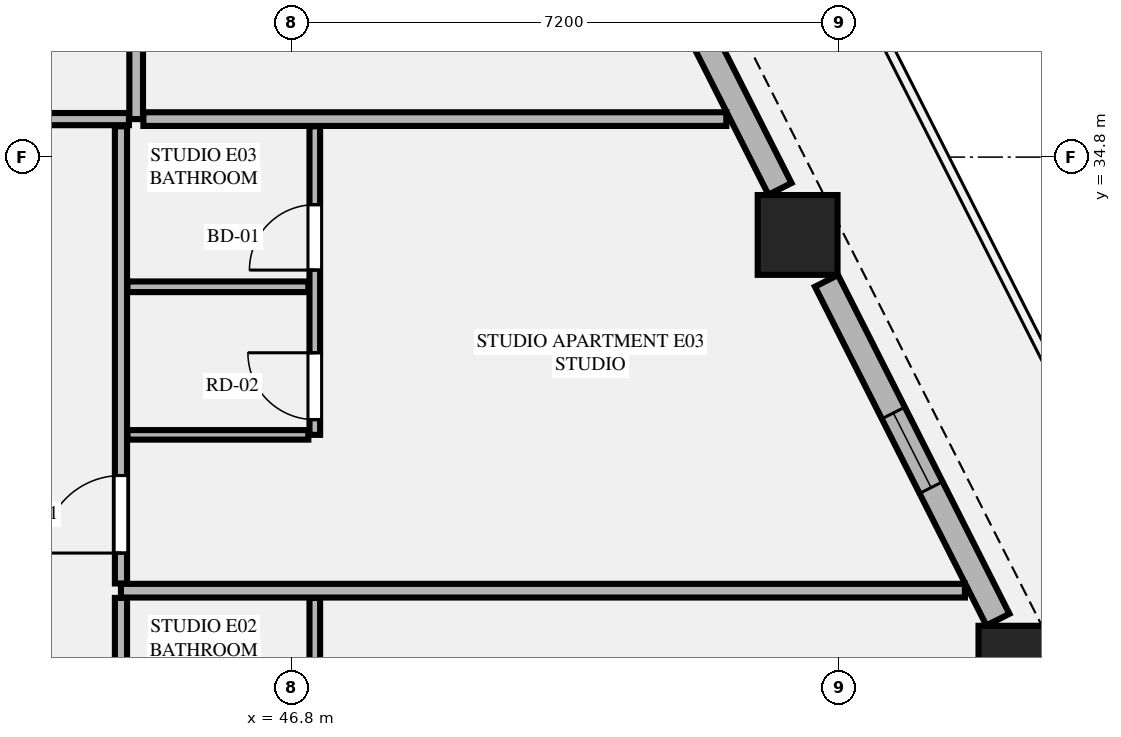
"""IFC4 building model, lengths in metres.
Left out: names, types, materials, properties, quantities, classifications, styles, units other than length and angle.
Written with IfcOpenShell. Run it as: python <this file> out.ifc"""

import sys

from ifc_helpers import new_model, si_unit, direction, frame, frame_2d, origin, origin_2d, place, context, subcontext, project, spatial, rectangle, extrude, element, fill, save


model = new_model("IFC4")
c1 = context("Model", 3, precision=1e-05, world=origin(), true_north=direction((0.0, 1.0)))
c2 = subcontext(c1, "Body", "Model", "MODEL_VIEW")
j1 = project(units=[si_unit("LENGTHUNIT", "METRE"), si_unit("PLANEANGLEUNIT", "RADIAN")], contexts=[c1])
p1 = place(None, origin())
s1 = spatial("IfcSite", under=j1, at=p1, CompositionType="ELEMENT")
p2 = place(p1, origin())
s2 = spatial("IfcBuilding", under=s1, at=p2, CompositionType="ELEMENT")
p3 = place(p2, frame((0.0, 0.0, 98.4)))
s3 = spatial("IfcBuildingStorey", under=s2, at=p3, CompositionType="ELEMENT", Elevation=98.4)
for number, where, z_axis, x_axis in (
    (1, (56.357, 28.109, 0.0), (0.0, 0.0, 1.0), (1.0, 0.0, 0.0)),
    (2, (53.452, 33.776, 0.0), (0.0, 0.0, 1.0), (1.0, 0.0, 0.0)),
):
    element("IfcColumn", number, at=place(p3, frame(where, z_axis=z_axis, x_axis=x_axis)), inside=s3, PredefinedType="COLUMN", context=c2, shape_type="SweptSolid", body=[
        extrude(rectangle(XDim=1.05, YDim=1.05, at=origin_2d()), origin(), (0.0, 0.0, 1.0), 3.55),
    ])
p4 = place(p3, frame((56.087, 28.715, 0.0), z_axis=(0.0, 0.0, 1.0), x_axis=(-0.451431617681, 0.892305718102, 0.0)))
e3 = element("IfcWall", 3, at=p4, inside=s3, PredefinedType="STANDARD", context=c2, shape_type="SweptSolid", body=[
    extrude(rectangle(XDim=4.995, YDim=0.34, at=frame_2d((2.498, 0.0))), origin(), (0.0, 0.0, 1.0), 2.797),
])
p5 = place(p4, frame((1.947, 0.0, 0.75)))
e4 = element("IfcOpeningElement", 4, at=p5, cuts=e3, PredefinedType="OPENING", context=c2, shape_type="SweptSolid", body=[
    extrude(rectangle(XDim=1.1, YDim=1.897, at=frame_2d((0.55, 0.948))), frame((0.0, 0.18, 0.0), z_axis=(0.0, -1.0, 0.0), x_axis=(1.0, 0.0, 0.0)), (0.0, 0.0, 1.0), 0.36),
])
p6 = place(p3, frame((53.22, 34.382, 0.0), z_axis=(0.0, 0.0, 1.0), x_axis=(-0.451567731634, 0.892236842855, 0.0)))
e5 = element("IfcWall", 5, at=p6, inside=s3, PredefinedType="STANDARD", context=c2, shape_type="SweptSolid", body=[
    extrude(rectangle(XDim=5.219, YDim=0.34, at=frame_2d((2.61, 0.0))), origin(), (0.0, 0.0, 1.0), 2.797),
])
p7 = place(p6, frame((2.499, 0.0, 0.0)))
e6 = element("IfcOpeningElement", 6, at=p7, cuts=e5, PredefinedType="OPENING", context=c2, shape_type="SweptSolid", body=[
    extrude(rectangle(XDim=1.5, YDim=2.3, at=frame_2d((0.75, 1.15))), frame((0.0, 0.18, 0.0), z_axis=(0.0, -1.0, 0.0), x_axis=(1.0, 0.0, 0.0)), (0.0, 0.0, 1.0), 0.36),
])
p8 = place(p3, frame((44.75, 35.3, 0.0), z_axis=(0.0, 0.0, 1.0), x_axis=(0.0, 1.0, 0.0)))
e7 = element("IfcWall", 7, at=p8, inside=s3, PredefinedType="PARTITIONING", context=c2, shape_type="SweptSolid", body=[
    extrude(rectangle(XDim=12.195, YDim=0.18, at=frame_2d((6.098, 0.0))), origin(), (0.0, 0.0, 1.0), 3.34),
])
p9 = place(p3, frame((36.327, 35.3, 0.0), z_axis=(0.0, 0.0, 1.0), x_axis=(1.0, 0.0, 0.0)))
e8 = element("IfcWall", 8, at=p9, inside=s3, PredefinedType="PARTITIONING", context=c2, shape_type="SweptSolid", body=[
    extrude(rectangle(XDim=8.328, YDim=0.16, at=frame_2d((4.164, 0.0))), origin(), (0.0, 0.0, 1.0), 3.34),
])
p10 = place(p9, frame((6.073, 0.0, 0.0)))
e9 = element("IfcOpeningElement", 9, at=p10, cuts=e8, PredefinedType="OPENING", context=c2, shape_type="SweptSolid", body=[
    extrude(rectangle(XDim=1.02, YDim=2.25, at=frame_2d((0.51, 1.125))), frame((0.0, 0.09, 0.0), z_axis=(0.0, -1.0, 0.0), x_axis=(1.0, 0.0, 0.0)), (0.0, 0.0, 1.0), 0.18),
])
p11 = place(p3, frame((44.845, 35.3, 0.0), z_axis=(0.0, 0.0, 1.0), x_axis=(1.0, 0.0, 0.0)))
e10 = element("IfcWall", 10, at=p11, inside=s3, PredefinedType="PARTITIONING", context=c2, shape_type="SweptSolid", body=[
    extrude(rectangle(XDim=7.669, YDim=0.18, at=frame_2d((3.834, 0.0))), origin(), (0.0, 0.0, 1.0), 3.34),
])
p12 = place(p3, frame((44.55, 22.987, 0.0), z_axis=(0.0, 0.0, 1.0), x_axis=(0.0, 1.0, 0.0)))
e11 = element("IfcWall", 11, at=p12, inside=s3, PredefinedType="PARTITIONING", context=c2, shape_type="SweptSolid", body=[
    extrude(rectangle(XDim=6.014, YDim=0.16, at=frame_2d((3.007, 0.0))), origin(), (0.0, 0.0, 1.0), 3.34),
])
p13 = place(p12, frame((0.4, 0.0, 0.0)))
e12 = element("IfcOpeningElement", 12, at=p13, cuts=e11, PredefinedType="OPENING", context=c2, shape_type="SweptSolid", body=[
    extrude(rectangle(XDim=1.02, YDim=2.25, at=frame_2d((0.51, 1.125))), frame((0.0, 0.09, 0.0), z_axis=(0.0, -1.0, 0.0), x_axis=(1.0, 0.0, 0.0)), (0.0, 0.0, 1.0), 0.18),
])
p14 = place(p3, frame((47.1, 24.942, 0.0), z_axis=(0.0, 0.0, 1.0), x_axis=(0.0, 1.0, 0.0)))
e13 = element("IfcWall", 13, at=p14, inside=s3, PredefinedType="PLUMBINGWALL", context=c2, shape_type="SweptSolid", body=[
    extrude(rectangle(XDim=4.059, YDim=0.14, at=frame_2d((2.03, 0.0))), origin(), (0.0, 0.0, 1.0), 3.34),
])
p15 = place(p14, frame((2.168, 0.0, 0.0)))
e14 = element("IfcOpeningElement", 14, at=p15, cuts=e13, PredefinedType="OPENING", context=c2, shape_type="SweptSolid", body=[
    extrude(rectangle(XDim=0.86, YDim=2.1, at=frame_2d((0.43, 1.05))), frame((0.0, 0.08, 0.0), z_axis=(0.0, -1.0, 0.0), x_axis=(1.0, 0.0, 0.0)), (0.0, 0.0, 1.0), 0.16),
])
p16 = place(p14, frame((0.2, 0.0, 0.0)))
e15 = element("IfcOpeningElement", 15, at=p16, cuts=e13, PredefinedType="OPENING", context=c2, shape_type="SweptSolid", body=[
    extrude(rectangle(XDim=0.88, YDim=2.15, at=frame_2d((0.44, 1.075))), frame((0.0, 0.08, 0.0), z_axis=(0.0, -1.0, 0.0), x_axis=(1.0, 0.0, 0.0)), (0.0, 0.0, 1.0), 0.16),
])
p17 = place(p3, frame((44.55, 29.096, 0.0), z_axis=(0.0, 0.0, 1.0), x_axis=(1.0, 0.0, 0.0)))
e16 = element("IfcWall", 16, at=p17, inside=s3, PredefinedType="PARTITIONING", context=c2, shape_type="SweptSolid", body=[
    extrude(rectangle(XDim=11.103, YDim=0.18, at=frame_2d((5.552, 0.0))), origin(), (0.0, 0.0, 1.0), 3.34),
])
p18 = place(p3, frame((44.55, 29.191, 0.0), z_axis=(0.0, 0.0, 1.0), x_axis=(0.0, 1.0, 0.0)))
e17 = element("IfcWall", 17, at=p18, inside=s3, PredefinedType="PARTITIONING", context=c2, shape_type="SweptSolid", body=[
    extrude(rectangle(XDim=6.014, YDim=0.16, at=frame_2d((3.007, 0.0))), origin(), (0.0, 0.0, 1.0), 3.34),
])
p19 = place(p18, frame((0.4, 0.0, 0.0)))
e18 = element("IfcOpeningElement", 18, at=p19, cuts=e17, PredefinedType="OPENING", context=c2, shape_type="SweptSolid", body=[
    extrude(rectangle(XDim=1.02, YDim=2.25, at=frame_2d((0.51, 1.125))), frame((0.0, 0.09, 0.0), z_axis=(0.0, -1.0, 0.0), x_axis=(1.0, 0.0, 0.0)), (0.0, 0.0, 1.0), 0.18),
])
p20 = place(p3, frame((44.635, 31.146, 0.0), z_axis=(0.0, 0.0, 1.0), x_axis=(1.0, 0.0, 0.0)))
e19 = element("IfcWall", 19, at=p20, inside=s3, PredefinedType="PARTITIONING", context=c2, shape_type="SweptSolid", body=[
    extrude(rectangle(XDim=2.38, YDim=0.125, at=frame_2d((1.19, 0.0))), origin(), (0.0, 0.0, 1.0), 3.34),
])
p21 = place(p3, frame((47.1, 31.146, 0.0), z_axis=(0.0, 0.0, 1.0), x_axis=(0.0, 1.0, 0.0)))
e20 = element("IfcWall", 20, at=p21, inside=s3, PredefinedType="PLUMBINGWALL", context=c2, shape_type="SweptSolid", body=[
    extrude(rectangle(XDim=4.059, YDim=0.14, at=frame_2d((2.03, 0.0))), origin(), (0.0, 0.0, 1.0), 3.34),
])
p22 = place(p21, frame((2.168, 0.0, 0.0)))
e21 = element("IfcOpeningElement", 21, at=p22, cuts=e20, PredefinedType="OPENING", context=c2, shape_type="SweptSolid", body=[
    extrude(rectangle(XDim=0.86, YDim=2.1, at=frame_2d((0.43, 1.05))), frame((0.0, 0.08, 0.0), z_axis=(0.0, -1.0, 0.0), x_axis=(1.0, 0.0, 0.0)), (0.0, 0.0, 1.0), 0.16),
])
p23 = place(p21, frame((0.2, 0.0, 0.0)))
e22 = element("IfcOpeningElement", 22, at=p23, cuts=e20, PredefinedType="OPENING", context=c2, shape_type="SweptSolid", body=[
    extrude(rectangle(XDim=0.88, YDim=2.15, at=frame_2d((0.44, 1.075))), frame((0.0, 0.08, 0.0), z_axis=(0.0, -1.0, 0.0), x_axis=(1.0, 0.0, 0.0)), (0.0, 0.0, 1.0), 0.16),
])
p24 = place(p3, frame((44.635, 33.094, 0.0), z_axis=(0.0, 0.0, 1.0), x_axis=(1.0, 0.0, 0.0)))
e23 = element("IfcWall", 23, at=p24, inside=s3, PredefinedType="PLUMBINGWALL", context=c2, shape_type="SweptSolid", body=[
    extrude(rectangle(XDim=2.38, YDim=0.14, at=frame_2d((1.19, 0.0))), origin(), (0.0, 0.0, 1.0), 3.34),
])
p25 = place(p5, origin())
e24 = element("IfcWindow", 24, at=p25, inside=s3, PartitioningType="SINGLE_PANEL", PredefinedType="WINDOW", context=c2, shape_type="SweptSolid", body=[
    extrude(rectangle(XDim=1.1, YDim=1.897, at=frame_2d((0.55, 0.948))), frame((0.0, 0.03, 0.0), z_axis=(0.0, -1.0, 0.0), x_axis=(1.0, 0.0, 0.0)), (0.0, 0.0, 1.0), 0.06),
])
fill(e4, e24)
p26 = place(p22, origin())
e25 = element("IfcDoor", 25, at=p26, inside=s3, OperationType="SINGLE_SWING_LEFT", PredefinedType="DOOR", context=c2, shape_type="SweptSolid", body=[
    extrude(rectangle(XDim=0.86, YDim=2.1, at=frame_2d((0.43, 1.05))), frame((0.0, 0.025, 0.0), z_axis=(0.0, -1.0, 0.0), x_axis=(1.0, 0.0, 0.0)), (0.0, 0.0, 1.0), 0.05),
])
fill(e21, e25)
p27 = place(p19, origin())
e26 = element("IfcDoor", 26, at=p27, inside=s3, OperationType="SINGLE_SWING_LEFT", PredefinedType="DOOR", context=c2, shape_type="SweptSolid", body=[
    extrude(rectangle(XDim=1.02, YDim=2.25, at=frame_2d((0.51, 1.125))), frame((0.0, 0.025, 0.0), z_axis=(0.0, -1.0, 0.0), x_axis=(1.0, 0.0, 0.0)), (0.0, 0.0, 1.0), 0.05),
])
fill(e18, e26)
p28 = place(p23, origin())
e27 = element("IfcDoor", 27, at=p28, inside=s3, OperationType="SINGLE_SWING_RIGHT", PredefinedType="DOOR", context=c2, shape_type="SweptSolid", body=[
    extrude(rectangle(XDim=0.88, YDim=2.15, at=frame_2d((0.44, 1.075))), frame((0.0, 0.025, 0.0), z_axis=(0.0, -1.0, 0.0), x_axis=(1.0, 0.0, 0.0)), (0.0, 0.0, 1.0), 0.05),
])
fill(e22, e27)
save(model, sys.argv[1])
